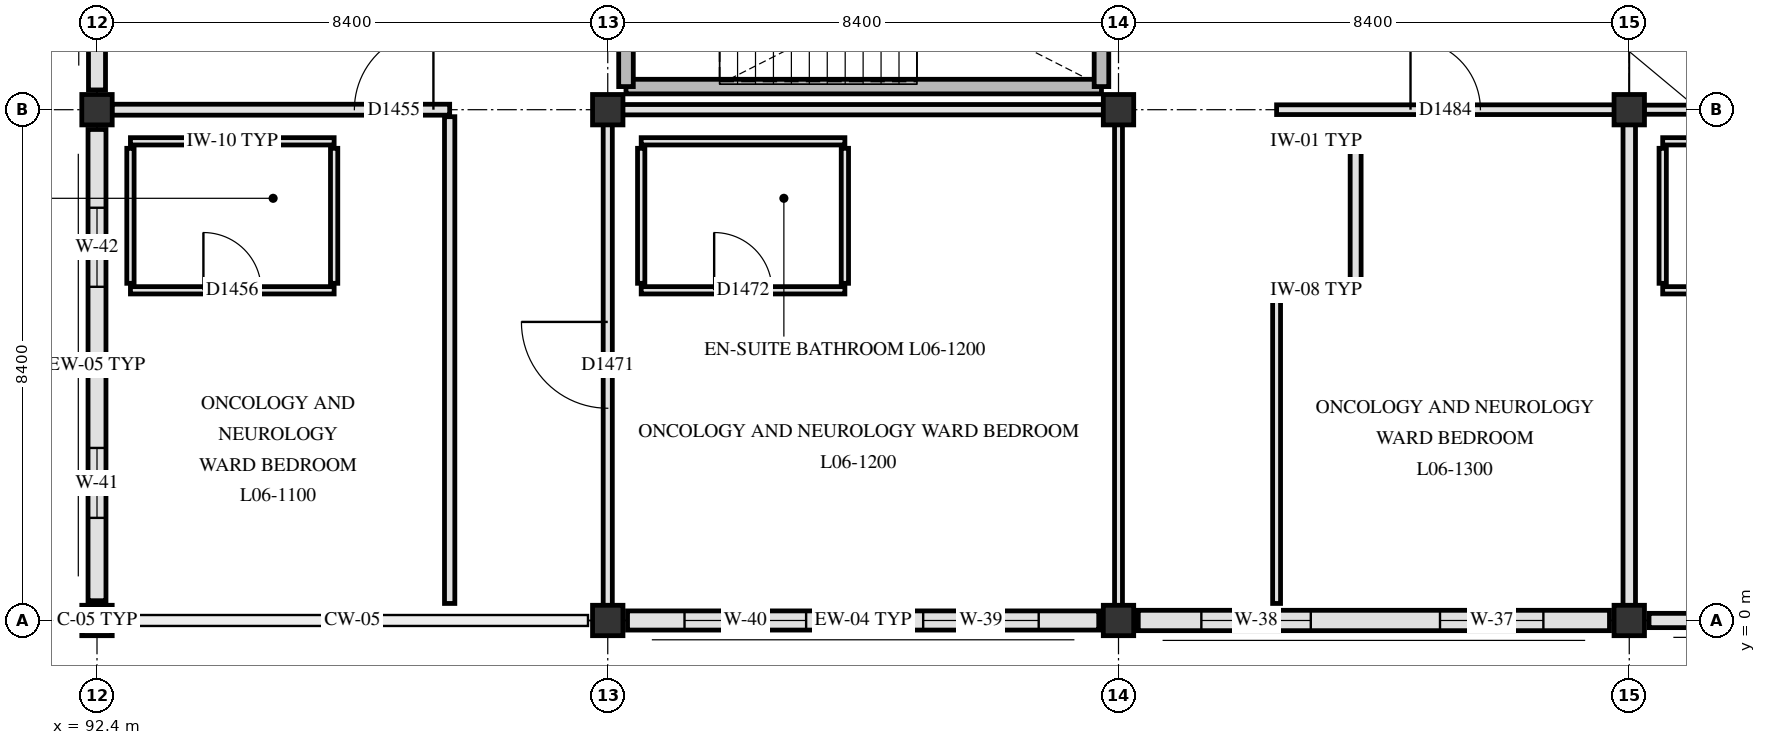
"""IFC4 building model, lengths in metres.
Left out: names, types, materials, properties, quantities, classifications, styles, units other than length and angle.
Written with IfcOpenShell. Run it as: python <this file> out.ifc"""

import sys

from ifc_helpers import new_model, si_unit, direction, frame, frame_2d, origin, origin_2d, place, context, subcontext, project, spatial, rectangle, extrude, element, fill, save


model = new_model("IFC4")
c1 = context("Model", 3, precision=1e-05, world=origin(), true_north=direction((0.0, 1.0)))
c2 = subcontext(c1, "Body", "Model", "MODEL_VIEW")
j1 = project(units=[si_unit("LENGTHUNIT", "METRE"), si_unit("PLANEANGLEUNIT", "RADIAN")], contexts=[c1])
p1 = place(None, origin())
s1 = spatial("IfcSite", under=j1, at=p1, CompositionType="ELEMENT")
p2 = place(p1, origin())
s2 = spatial("IfcBuilding", under=s1, at=p2, CompositionType="ELEMENT")
p3 = place(p2, frame((0.0, 0.0, 26.4)))
s3 = spatial("IfcBuildingStorey", under=s2, at=p3, CompositionType="ELEMENT", Elevation=26.4)
for number, where, z_axis, x_axis in (
    (1, (92.4, 0.0, 0.0), (0.0, 0.0, 1.0), (1.0, 0.0, 0.0)),
    (2, (92.4, 8.4, 0.0), (0.0, 0.0, 1.0), (1.0, 0.0, 0.0)),
    (3, (100.8, 0.0, 0.0), (0.0, 0.0, 1.0), (1.0, 0.0, 0.0)),
    (4, (100.8, 8.4, 0.0), (0.0, 0.0, 1.0), (1.0, 0.0, 0.0)),
    (5, (109.2, 0.0, 0.0), (0.0, 0.0, 1.0), (1.0, 0.0, 0.0)),
    (6, (109.2, 8.4, 0.0), (0.0, 0.0, 1.0), (1.0, 0.0, 0.0)),
    (7, (117.6, 0.0, 0.0), (0.0, 0.0, 1.0), (1.0, 0.0, 0.0)),
    (8, (117.6, 8.4, 0.0), (0.0, 0.0, 1.0), (1.0, 0.0, 0.0)),
):
    element("IfcColumn", number, at=place(p3, frame(where, z_axis=z_axis, x_axis=x_axis)), inside=s3, PredefinedType="COLUMN", context=c2, shape_type="SweptSolid", body=[
        extrude(rectangle(XDim=0.5, YDim=0.5, at=origin_2d()), origin(), (0.0, 0.0, 1.0), 3.9),
    ])
p4 = place(p3, frame((125.675, 0.0, 0.0), z_axis=(0.0, 0.0, 1.0), x_axis=(-1.0, 0.0, 0.0)))
e9 = element("IfcWall", 9, at=p4, inside=s3, PredefinedType="SOLIDWALL", context=c2, shape_type="SweptSolid", body=[
    extrude(rectangle(XDim=7.75, YDim=0.235, at=frame_2d((3.875, 0.0))), origin(), (0.0, 0.0, 1.0), 3.36),
])
p5 = place(p4, frame((1.188, 0.0, 0.85)))
e10 = element("IfcOpeningElement", 10, at=p5, cuts=e9, PredefinedType="OPENING", context=c2, shape_type="SweptSolid", body=[
    extrude(rectangle(XDim=1.5, YDim=1.66, at=frame_2d((0.75, 0.83))), frame((0.0, 0.127, 0.0), z_axis=(0.0, -1.0, 0.0), x_axis=(1.0, 0.0, 0.0)), (0.0, 0.0, 1.0), 0.255),
])
p6 = place(p4, frame((5.012, 0.0, 0.85)))
e11 = element("IfcOpeningElement", 11, at=p6, cuts=e9, PredefinedType="OPENING", context=c2, shape_type="SweptSolid", body=[
    extrude(rectangle(XDim=1.6, YDim=1.66, at=frame_2d((0.8, 0.83))), frame((0.0, 0.127, 0.0), z_axis=(0.0, -1.0, 0.0), x_axis=(1.0, 0.0, 0.0)), (0.0, 0.0, 1.0), 0.255),
])
p7 = place(p3, frame((117.275, 0.0, 0.0), z_axis=(0.0, 0.0, 1.0), x_axis=(-1.0, 0.0, 0.0)))
e12 = element("IfcWall", 12, at=p7, inside=s3, PredefinedType="SOLIDWALL", context=c2, shape_type="SweptSolid", body=[
    extrude(rectangle(XDim=7.75, YDim=0.335, at=frame_2d((3.875, 0.0))), origin(), (0.0, 0.0, 1.0), 3.36),
])
p8 = place(p7, frame((1.087, 0.0, 0.85)))
e13 = element("IfcOpeningElement", 13, at=p8, cuts=e12, PredefinedType="OPENING", context=c2, shape_type="SweptSolid", body=[
    extrude(rectangle(XDim=1.7, YDim=1.66, at=frame_2d((0.85, 0.83))), frame((0.0, 0.177, 0.0), z_axis=(0.0, -1.0, 0.0), x_axis=(1.0, 0.0, 0.0)), (0.0, 0.0, 1.0), 0.355),
])
p9 = place(p7, frame((4.913, 0.0, 0.85)))
e14 = element("IfcOpeningElement", 14, at=p9, cuts=e12, PredefinedType="OPENING", context=c2, shape_type="SweptSolid", body=[
    extrude(rectangle(XDim=1.8, YDim=1.66, at=frame_2d((0.9, 0.83))), frame((0.0, 0.177, 0.0), z_axis=(0.0, -1.0, 0.0), x_axis=(1.0, 0.0, 0.0)), (0.0, 0.0, 1.0), 0.355),
])
p10 = place(p3, frame((108.875, 0.0, 0.0), z_axis=(0.0, 0.0, 1.0), x_axis=(-1.0, 0.0, 0.0)))
e15 = element("IfcWall", 15, at=p10, inside=s3, PredefinedType="SOLIDWALL", context=c2, shape_type="SweptSolid", body=[
    extrude(rectangle(XDim=7.75, YDim=0.315, at=frame_2d((3.875, 0.0))), origin(), (0.0, 0.0, 1.0), 3.36),
])
p11 = place(p10, frame((0.988, 0.0, 0.85)))
e16 = element("IfcOpeningElement", 16, at=p11, cuts=e15, PredefinedType="OPENING", context=c2, shape_type="SweptSolid", body=[
    extrude(rectangle(XDim=1.9, YDim=1.66, at=frame_2d((0.95, 0.83))), frame((0.0, 0.167, 0.0), z_axis=(0.0, -1.0, 0.0), x_axis=(1.0, 0.0, 0.0)), (0.0, 0.0, 1.0), 0.335),
])
p12 = place(p10, frame((4.812, 0.0, 0.85)))
e17 = element("IfcOpeningElement", 17, at=p12, cuts=e15, PredefinedType="OPENING", context=c2, shape_type="SweptSolid", body=[
    extrude(rectangle(XDim=2.0, YDim=1.66, at=frame_2d((1.0, 0.83))), frame((0.0, 0.167, 0.0), z_axis=(0.0, -1.0, 0.0), x_axis=(1.0, 0.0, 0.0)), (0.0, 0.0, 1.0), 0.335),
])
p13 = place(p3, frame((92.4, 0.325, 0.0), z_axis=(0.0, 0.0, 1.0), x_axis=(0.0, 1.0, 0.0)))
e18 = element("IfcWall", 18, at=p13, inside=s3, PredefinedType="SOLIDWALL", context=c2, shape_type="SweptSolid", body=[
    extrude(rectangle(XDim=7.75, YDim=0.295, at=frame_2d((3.875, 0.0))), origin(), (0.0, 0.0, 1.0), 3.34),
])
p14 = place(p13, frame((1.363, 0.0, 0.85)))
e19 = element("IfcOpeningElement", 19, at=p14, cuts=e18, PredefinedType="OPENING", context=c2, shape_type="SweptSolid", body=[
    extrude(rectangle(XDim=1.15, YDim=1.78, at=frame_2d((0.575, 0.89))), frame((0.0, 0.157, 0.0), z_axis=(0.0, -1.0, 0.0), x_axis=(1.0, 0.0, 0.0)), (0.0, 0.0, 1.0), 0.315),
])
p15 = place(p13, frame((5.163, 0.0, 0.85)))
e20 = element("IfcOpeningElement", 20, at=p15, cuts=e18, PredefinedType="OPENING", context=c2, shape_type="SweptSolid", body=[
    extrude(rectangle(XDim=1.3, YDim=1.78, at=frame_2d((0.65, 0.89))), frame((0.0, 0.157, 0.0), z_axis=(0.0, -1.0, 0.0), x_axis=(1.0, 0.0, 0.0)), (0.0, 0.0, 1.0), 0.315),
])
p16 = place(p3, frame((92.4, 8.725, 0.0), z_axis=(0.0, 0.0, 1.0), x_axis=(0.0, 1.0, 0.0)))
e21 = element("IfcWall", 21, at=p16, inside=s3, PredefinedType="SOLIDWALL", context=c2, shape_type="SweptSolid", body=[
    extrude(rectangle(XDim=7.75, YDim=0.28, at=frame_2d((3.875, 0.0))), origin(), (0.0, 0.0, 1.0), 3.34),
])
p17 = place(p16, frame((1.212, 0.0, 0.85)))
e22 = element("IfcOpeningElement", 22, at=p17, cuts=e21, PredefinedType="OPENING", context=c2, shape_type="SweptSolid", body=[
    extrude(rectangle(XDim=1.45, YDim=1.78, at=frame_2d((0.725, 0.89))), frame((0.0, 0.15, 0.0), z_axis=(0.0, -1.0, 0.0), x_axis=(1.0, 0.0, 0.0)), (0.0, 0.0, 1.0), 0.3),
])
p18 = place(p16, frame((5.012, 0.0, 0.85)))
e23 = element("IfcOpeningElement", 23, at=p18, cuts=e21, PredefinedType="OPENING", context=c2, shape_type="SweptSolid", body=[
    extrude(rectangle(XDim=1.6, YDim=1.78, at=frame_2d((0.8, 0.89))), frame((0.0, 0.15, 0.0), z_axis=(0.0, -1.0, 0.0), x_axis=(1.0, 0.0, 0.0)), (0.0, 0.0, 1.0), 0.3),
])
p19 = place(p3, frame((101.1, 8.78, 0.0), z_axis=(0.0, 0.0, 1.0), x_axis=(1.0, 0.0, 0.0)))
e24 = element("IfcWall", 24, at=p19, inside=s3, PredefinedType="SHEAR", context=c2, shape_type="SweptSolid", body=[
    extrude(rectangle(XDim=7.82, YDim=0.24, at=frame_2d((3.91, 0.0))), origin(), (0.0, 0.0, 1.0), 3.62),
])
for number, where, z_axis, x_axis in (
    (25, (101.1, 8.78, 0.0), (0.0, 0.0, 1.0), (0.0, 1.0, 0.0)),
    (26, (108.92, 8.78, 0.0), (0.0, 0.0, 1.0), (0.0, 1.0, 0.0)),
):
    element("IfcWall", number, at=place(p3, frame(where, z_axis=z_axis, x_axis=x_axis)), inside=s3, PredefinedType="SHEAR", context=c2, shape_type="SweptSolid", body=[
        extrude(rectangle(XDim=3.32, YDim=0.24, at=frame_2d((1.66, 0.0))), origin(), (0.0, 0.0, 1.0), 3.62),
    ])
p20 = place(p3, frame((92.95, 5.43, 0.0), z_axis=(0.0, 0.0, 1.0), x_axis=(1.0, 0.0, 0.0)))
e27 = element("IfcWall", 27, at=p20, inside=s3, PredefinedType="PARTITIONING", context=c2, shape_type="SweptSolid", body=[
    extrude(rectangle(XDim=3.35, YDim=0.12, at=frame_2d((1.675, 0.0))), origin(), (0.0, 0.0, 1.0), 3.61),
])
p21 = place(p20, frame((1.2, 0.0, 0.0)))
e28 = element("IfcOpeningElement", 28, at=p21, cuts=e27, PredefinedType="OPENING", context=c2, shape_type="SweptSolid", body=[
    extrude(rectangle(XDim=0.95, YDim=2.1, at=frame_2d((0.475, 1.05))), frame((0.0, 0.07, 0.0), z_axis=(0.0, -1.0, 0.0), x_axis=(1.0, 0.0, 0.0)), (0.0, 0.0, 1.0), 0.14),
])
p22 = place(p3, frame((101.35, 5.43, 0.0), z_axis=(0.0, 0.0, 1.0), x_axis=(1.0, 0.0, 0.0)))
e29 = element("IfcWall", 29, at=p22, inside=s3, PredefinedType="PARTITIONING", context=c2, shape_type="SweptSolid", body=[
    extrude(rectangle(XDim=3.35, YDim=0.12, at=frame_2d((1.675, 0.0))), origin(), (0.0, 0.0, 1.0), 3.61),
])
p23 = place(p22, frame((1.2, 0.0, 0.0)))
e30 = element("IfcOpeningElement", 30, at=p23, cuts=e29, PredefinedType="OPENING", context=c2, shape_type="SweptSolid", body=[
    extrude(rectangle(XDim=0.95, YDim=2.1, at=frame_2d((0.475, 1.05))), frame((0.0, 0.07, 0.0), z_axis=(0.0, -1.0, 0.0), x_axis=(1.0, 0.0, 0.0)), (0.0, 0.0, 1.0), 0.14),
])
p24 = place(p3, frame((111.8, 5.43, 0.0), z_axis=(0.0, 0.0, 1.0), x_axis=(1.0, 0.0, 0.0)))
e31 = element("IfcWall", 31, at=p24, inside=s3, PredefinedType="PARTITIONING", context=c2, shape_type="SweptSolid", body=[
    extrude(rectangle(XDim=1.3, YDim=0.14, at=frame_2d((0.65, 0.0))), origin(), (0.0, 0.0, 1.0), 3.61),
])
p25 = place(p3, frame((118.15, 5.43, 0.0), z_axis=(0.0, 0.0, 1.0), x_axis=(1.0, 0.0, 0.0)))
e32 = element("IfcWall", 32, at=p25, inside=s3, PredefinedType="PARTITIONING", context=c2, shape_type="SweptSolid", body=[
    extrude(rectangle(XDim=3.35, YDim=0.12, at=frame_2d((1.675, 0.0))), origin(), (0.0, 0.0, 1.0), 3.61),
])
p26 = place(p25, frame((1.2, 0.0, 0.0)))
e33 = element("IfcOpeningElement", 33, at=p26, cuts=e32, PredefinedType="OPENING", context=c2, shape_type="SweptSolid", body=[
    extrude(rectangle(XDim=0.95, YDim=2.1, at=frame_2d((0.475, 1.05))), frame((0.0, 0.07, 0.0), z_axis=(0.0, -1.0, 0.0), x_axis=(1.0, 0.0, 0.0)), (0.0, 0.0, 1.0), 0.14),
])
p27 = place(p3, frame((92.95, 7.88, 0.0), z_axis=(0.0, 0.0, 1.0), x_axis=(1.0, 0.0, 0.0)))
e34 = element("IfcWall", 34, at=p27, inside=s3, PredefinedType="PARTITIONING", context=c2, shape_type="SweptSolid", body=[
    extrude(rectangle(XDim=3.35, YDim=0.12, at=frame_2d((1.675, 0.0))), origin(), (0.0, 0.0, 1.0), 3.61),
])
p28 = place(p3, frame((101.35, 7.88, 0.0), z_axis=(0.0, 0.0, 1.0), x_axis=(1.0, 0.0, 0.0)))
e35 = element("IfcWall", 35, at=p28, inside=s3, PredefinedType="PARTITIONING", context=c2, shape_type="SweptSolid", body=[
    extrude(rectangle(XDim=3.35, YDim=0.12, at=frame_2d((1.675, 0.0))), origin(), (0.0, 0.0, 1.0), 3.61),
])
p29 = place(p3, frame((111.8, 7.88, 0.0), z_axis=(0.0, 0.0, 1.0), x_axis=(1.0, 0.0, 0.0)))
e36 = element("IfcWall", 36, at=p29, inside=s3, PredefinedType="PARTITIONING", context=c2, shape_type="SweptSolid", body=[
    extrude(rectangle(XDim=1.3, YDim=0.22, at=frame_2d((0.65, 0.0))), origin(), (0.0, 0.0, 1.0), 3.61),
])
p30 = place(p3, frame((118.15, 7.88, 0.0), z_axis=(0.0, 0.0, 1.0), x_axis=(1.0, 0.0, 0.0)))
e37 = element("IfcWall", 37, at=p30, inside=s3, PredefinedType="PARTITIONING", context=c2, shape_type="SweptSolid", body=[
    extrude(rectangle(XDim=3.35, YDim=0.12, at=frame_2d((1.675, 0.0))), origin(), (0.0, 0.0, 1.0), 3.61),
])
p31 = place(p3, frame((92.645, 8.4, 0.0), z_axis=(0.0, 0.0, 1.0), x_axis=(1.0, 0.0, 0.0)))
e38 = element("IfcWall", 38, at=p31, inside=s3, PredefinedType="PARTITIONING", context=c2, shape_type="SweptSolid", body=[
    extrude(rectangle(XDim=5.555, YDim=0.18, at=frame_2d((2.777, 0.0))), origin(), (0.0, 0.0, 1.0), 3.21),
])
p32 = place(p31, frame((3.988, 0.0, 0.0)))
e39 = element("IfcOpeningElement", 39, at=p32, cuts=e38, PredefinedType="OPENING", context=c2, shape_type="SweptSolid", body=[
    extrude(rectangle(XDim=1.3, YDim=2.2, at=frame_2d((0.65, 1.1))), frame((0.0, 0.1, 0.0), z_axis=(0.0, -1.0, 0.0), x_axis=(1.0, 0.0, 0.0)), (0.0, 0.0, 1.0), 0.2),
])
p33 = place(p3, frame((101.045, 8.4, 0.0), z_axis=(0.0, 0.0, 1.0), x_axis=(1.0, 0.0, 0.0)))
e40 = element("IfcWall", 40, at=p33, inside=s3, PredefinedType="PARTITIONING", context=c2, shape_type="SweptSolid", body=[
    extrude(rectangle(XDim=7.91, YDim=0.17, at=frame_2d((3.955, 0.0))), origin(), (0.0, 0.0, 1.0), 3.21),
])
p34 = place(p3, frame((111.8, 8.4, 0.0), z_axis=(0.0, 0.0, 1.0), x_axis=(1.0, 0.0, 0.0)))
e41 = element("IfcWall", 41, at=p34, inside=s3, PredefinedType="PARTITIONING", context=c2, shape_type="SweptSolid", body=[
    extrude(rectangle(XDim=5.555, YDim=0.16, at=frame_2d((2.777, 0.0))), origin(), (0.0, 0.0, 1.0), 3.21),
])
p35 = place(p34, frame((2.202, 0.0, 0.0)))
e42 = element("IfcOpeningElement", 42, at=p35, cuts=e41, PredefinedType="OPENING", context=c2, shape_type="SweptSolid", body=[
    extrude(rectangle(XDim=1.15, YDim=2.15, at=frame_2d((0.575, 1.075))), frame((0.0, 0.09, 0.0), z_axis=(0.0, -1.0, 0.0), x_axis=(1.0, 0.0, 0.0)), (0.0, 0.0, 1.0), 0.18),
])
p36 = place(p3, frame((117.845, 8.4, 0.0), z_axis=(0.0, 0.0, 1.0), x_axis=(1.0, 0.0, 0.0)))
e43 = element("IfcWall", 43, at=p36, inside=s3, PredefinedType="PARTITIONING", context=c2, shape_type="SweptSolid", body=[
    extrude(rectangle(XDim=7.91, YDim=0.15, at=frame_2d((3.955, 0.0))), origin(), (0.0, 0.0, 1.0), 3.21),
])
p37 = place(p36, frame((4.315, 0.0, 0.0)))
e44 = element("IfcOpeningElement", 44, at=p37, cuts=e43, PredefinedType="OPENING", context=c2, shape_type="SweptSolid", body=[
    extrude(rectangle(XDim=1.58, YDim=2.22, at=frame_2d((0.79, 1.11))), frame((0.0, 0.085, 0.0), z_axis=(0.0, -1.0, 0.0), x_axis=(1.0, 0.0, 0.0)), (0.0, 0.0, 1.0), 0.17),
])
for number, where, z_axis, x_axis in (
    (45, (92.95, 5.545, 0.0), (0.0, 0.0, 1.0), (0.0, 1.0, 0.0)),
    (46, (96.3, 5.545, 0.0), (0.0, 0.0, 1.0), (0.0, 1.0, 0.0)),
):
    element("IfcWall", number, at=place(p3, frame(where, z_axis=z_axis, x_axis=x_axis)), inside=s3, PredefinedType="PARTITIONING", context=c2, shape_type="SweptSolid", body=[
        extrude(rectangle(XDim=2.22, YDim=0.12, at=frame_2d((1.11, 0.0))), origin(), (0.0, 0.0, 1.0), 3.34),
    ])
p38 = place(p3, frame((98.2, 0.28, 0.0), z_axis=(0.0, 0.0, 1.0), x_axis=(0.0, 1.0, 0.0)))
e47 = element("IfcWall", 47, at=p38, inside=s3, PredefinedType="PARTITIONING", context=c2, shape_type="SweptSolid", body=[
    extrude(rectangle(XDim=8.005, YDim=0.17, at=frame_2d((4.002, 0.0))), origin(), (0.0, 0.0, 1.0), 3.34),
])
p39 = place(p3, frame((100.8, 0.245, 0.0), z_axis=(0.0, 0.0, 1.0), x_axis=(0.0, 1.0, 0.0)))
e48 = element("IfcWall", 48, at=p39, inside=s3, PredefinedType="PARTITIONING", context=c2, shape_type="SweptSolid", body=[
    extrude(rectangle(XDim=7.91, YDim=0.15, at=frame_2d((3.955, 0.0))), origin(), (0.0, 0.0, 1.0), 3.21),
])
p40 = place(p39, frame((3.245, 0.0, 0.0)))
e49 = element("IfcOpeningElement", 49, at=p40, cuts=e48, PredefinedType="OPENING", context=c2, shape_type="SweptSolid", body=[
    extrude(rectangle(XDim=1.42, YDim=2.22, at=frame_2d((0.71, 1.11))), frame((0.0, 0.085, 0.0), z_axis=(0.0, -1.0, 0.0), x_axis=(1.0, 0.0, 0.0)), (0.0, 0.0, 1.0), 0.17),
])
for number, where, z_axis, x_axis in (
    (50, (101.35, 5.545, 0.0), (0.0, 0.0, 1.0), (0.0, 1.0, 0.0)),
    (51, (104.7, 5.545, 0.0), (0.0, 0.0, 1.0), (0.0, 1.0, 0.0)),
):
    element("IfcWall", number, at=place(p3, frame(where, z_axis=z_axis, x_axis=x_axis)), inside=s3, PredefinedType="PARTITIONING", context=c2, shape_type="SweptSolid", body=[
        extrude(rectangle(XDim=2.22, YDim=0.12, at=frame_2d((1.11, 0.0))), origin(), (0.0, 0.0, 1.0), 3.34),
    ])
p41 = place(p3, frame((109.2, 0.245, 0.0), z_axis=(0.0, 0.0, 1.0), x_axis=(0.0, 1.0, 0.0)))
e52 = element("IfcWall", 52, at=p41, inside=s3, PredefinedType="PARTITIONING", context=c2, shape_type="SweptSolid", body=[
    extrude(rectangle(XDim=7.91, YDim=0.13, at=frame_2d((3.955, 0.0))), origin(), (0.0, 0.0, 1.0), 3.21),
])
p42 = place(p3, frame((111.8, 0.28, 0.0), z_axis=(0.0, 0.0, 1.0), x_axis=(0.0, 1.0, 0.0)))
e53 = element("IfcWall", 53, at=p42, inside=s3, PredefinedType="PARTITIONING", context=c2, shape_type="SweptSolid", body=[
    extrude(rectangle(XDim=5.035, YDim=0.13, at=frame_2d((2.518, 0.0))), origin(), (0.0, 0.0, 1.0), 3.34),
])
p43 = place(p3, frame((113.1, 5.545, 0.0), z_axis=(0.0, 0.0, 1.0), x_axis=(0.0, 1.0, 0.0)))
e54 = element("IfcWall", 54, at=p43, inside=s3, PredefinedType="PARTITIONING", context=c2, shape_type="SweptSolid", body=[
    extrude(rectangle(XDim=2.22, YDim=0.18, at=frame_2d((1.11, 0.0))), origin(), (0.0, 0.0, 1.0), 3.34),
])
p44 = place(p3, frame((117.6, 0.245, 0.0), z_axis=(0.0, 0.0, 1.0), x_axis=(0.0, 1.0, 0.0)))
e55 = element("IfcWall", 55, at=p44, inside=s3, PredefinedType="PARTITIONING", context=c2, shape_type="SweptSolid", body=[
    extrude(rectangle(XDim=7.91, YDim=0.205, at=frame_2d((3.955, 0.0))), origin(), (0.0, 0.0, 1.0), 3.21),
])
p45 = place(p3, frame((118.15, 5.545, 0.0), z_axis=(0.0, 0.0, 1.0), x_axis=(0.0, 1.0, 0.0)))
e56 = element("IfcWall", 56, at=p45, inside=s3, PredefinedType="PARTITIONING", context=c2, shape_type="SweptSolid", body=[
    extrude(rectangle(XDim=2.22, YDim=0.12, at=frame_2d((1.11, 0.0))), origin(), (0.0, 0.0, 1.0), 3.34),
])
p46 = place(p8, origin())
e57 = element("IfcWindow", 57, at=p46, inside=s3, PartitioningType="SINGLE_PANEL", PredefinedType="WINDOW", context=c2, shape_type="SweptSolid", body=[
    extrude(rectangle(XDim=1.7, YDim=1.66, at=frame_2d((0.85, 0.83))), frame((0.0, 0.03, 0.0), z_axis=(0.0, -1.0, 0.0), x_axis=(1.0, 0.0, 0.0)), (0.0, 0.0, 1.0), 0.06),
])
fill(e13, e57)
p47 = place(p9, origin())
e58 = element("IfcWindow", 58, at=p47, inside=s3, PartitioningType="SINGLE_PANEL", PredefinedType="WINDOW", context=c2, shape_type="SweptSolid", body=[
    extrude(rectangle(XDim=1.8, YDim=1.66, at=frame_2d((0.9, 0.83))), frame((0.0, 0.03, 0.0), z_axis=(0.0, -1.0, 0.0), x_axis=(1.0, 0.0, 0.0)), (0.0, 0.0, 1.0), 0.06),
])
fill(e14, e58)
p48 = place(p11, origin())
e59 = element("IfcWindow", 59, at=p48, inside=s3, PartitioningType="SINGLE_PANEL", PredefinedType="WINDOW", context=c2, shape_type="SweptSolid", body=[
    extrude(rectangle(XDim=1.9, YDim=1.66, at=frame_2d((0.95, 0.83))), frame((0.0, 0.03, 0.0), z_axis=(0.0, -1.0, 0.0), x_axis=(1.0, 0.0, 0.0)), (0.0, 0.0, 1.0), 0.06),
])
fill(e16, e59)
p49 = place(p12, origin())
e60 = element("IfcWindow", 60, at=p49, inside=s3, PartitioningType="SINGLE_PANEL", PredefinedType="WINDOW", context=c2, shape_type="SweptSolid", body=[
    extrude(rectangle(XDim=2.0, YDim=1.66, at=frame_2d((1.0, 0.83))), frame((0.0, 0.03, 0.0), z_axis=(0.0, -1.0, 0.0), x_axis=(1.0, 0.0, 0.0)), (0.0, 0.0, 1.0), 0.06),
])
fill(e17, e60)
p50 = place(p14, origin())
e61 = element("IfcWindow", 61, at=p50, inside=s3, PartitioningType="SINGLE_PANEL", PredefinedType="WINDOW", context=c2, shape_type="SweptSolid", body=[
    extrude(rectangle(XDim=1.15, YDim=1.78, at=frame_2d((0.575, 0.89))), frame((0.0, 0.03, 0.0), z_axis=(0.0, -1.0, 0.0), x_axis=(1.0, 0.0, 0.0)), (0.0, 0.0, 1.0), 0.06),
])
fill(e19, e61)
p51 = place(p15, origin())
e62 = element("IfcWindow", 62, at=p51, inside=s3, PartitioningType="SINGLE_PANEL", PredefinedType="WINDOW", context=c2, shape_type="SweptSolid", body=[
    extrude(rectangle(XDim=1.3, YDim=1.78, at=frame_2d((0.65, 0.89))), frame((0.0, 0.03, 0.0), z_axis=(0.0, -1.0, 0.0), x_axis=(1.0, 0.0, 0.0)), (0.0, 0.0, 1.0), 0.06),
])
fill(e20, e62)
p52 = place(p32, origin())
e63 = element("IfcDoor", 63, at=p52, inside=s3, OperationType="SINGLE_SWING_RIGHT", PredefinedType="DOOR", context=c2, shape_type="SweptSolid", body=[
    extrude(rectangle(XDim=1.3, YDim=2.2, at=frame_2d((0.65, 1.1))), frame((0.0, 0.025, 0.0), z_axis=(0.0, -1.0, 0.0), x_axis=(1.0, 0.0, 0.0)), (0.0, 0.0, 1.0), 0.05),
])
fill(e39, e63)
p53 = place(p21, origin())
e64 = element("IfcDoor", 64, at=p53, inside=s3, OperationType="SINGLE_SWING_LEFT", PredefinedType="DOOR", context=c2, shape_type="SweptSolid", body=[
    extrude(rectangle(XDim=0.95, YDim=2.1, at=frame_2d((0.475, 1.05))), frame((0.0, 0.025, 0.0), z_axis=(0.0, -1.0, 0.0), x_axis=(1.0, 0.0, 0.0)), (0.0, 0.0, 1.0), 0.05),
])
fill(e28, e64)
p54 = place(p40, origin())
e65 = element("IfcDoor", 65, at=p54, inside=s3, OperationType="SINGLE_SWING_RIGHT", PredefinedType="DOOR", context=c2, shape_type="SweptSolid", body=[
    extrude(rectangle(XDim=1.42, YDim=2.22, at=frame_2d((0.71, 1.11))), frame((0.0, 0.025, 0.0), z_axis=(0.0, -1.0, 0.0), x_axis=(1.0, 0.0, 0.0)), (0.0, 0.0, 1.0), 0.05),
])
fill(e49, e65)
p55 = place(p23, origin())
e66 = element("IfcDoor", 66, at=p55, inside=s3, OperationType="SINGLE_SWING_LEFT", PredefinedType="DOOR", context=c2, shape_type="SweptSolid", body=[
    extrude(rectangle(XDim=0.95, YDim=2.1, at=frame_2d((0.475, 1.05))), frame((0.0, 0.025, 0.0), z_axis=(0.0, -1.0, 0.0), x_axis=(1.0, 0.0, 0.0)), (0.0, 0.0, 1.0), 0.05),
])
fill(e30, e66)
p56 = place(p35, origin())
e67 = element("IfcDoor", 67, at=p56, inside=s3, OperationType="SINGLE_SWING_LEFT", PredefinedType="DOOR", context=c2, shape_type="SweptSolid", body=[
    extrude(rectangle(XDim=1.15, YDim=2.15, at=frame_2d((0.575, 1.075))), frame((0.0, 0.025, 0.0), z_axis=(0.0, -1.0, 0.0), x_axis=(1.0, 0.0, 0.0)), (0.0, 0.0, 1.0), 0.05),
])
fill(e42, e67)
save(model, sys.argv[1])
